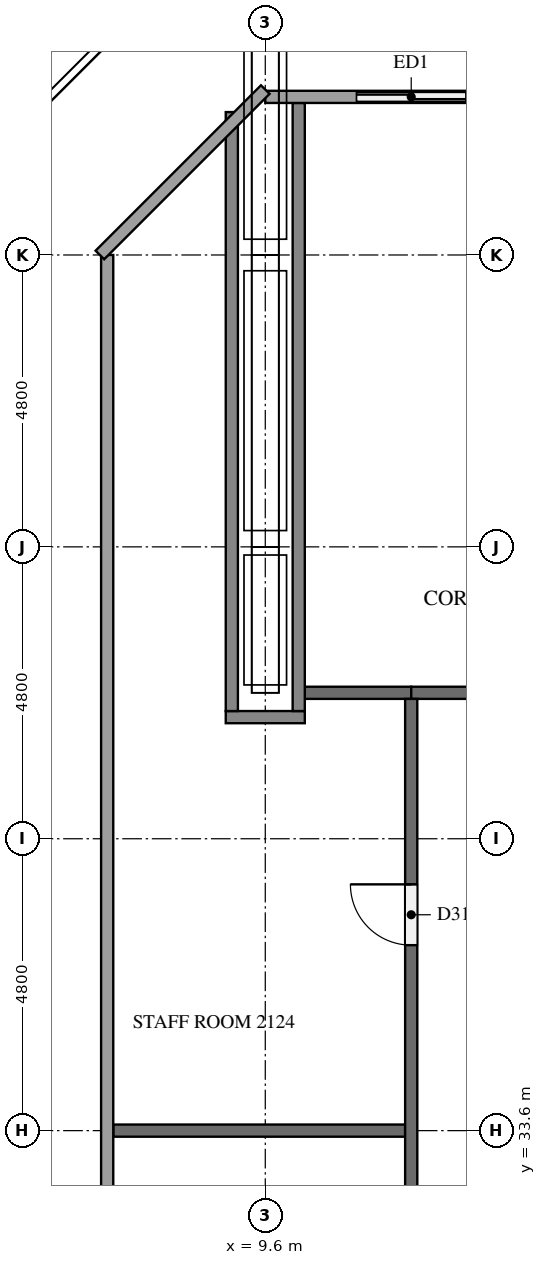
"""IFC4 building model, lengths in metres.
Left out: names, types, materials, properties, quantities, classifications, styles, units other than length and angle.
Written with IfcOpenShell. Run it as: python <this file> out.ifc"""

import sys

from ifc_helpers import new_model, si_unit, direction, frame, frame_2d, origin, place, context, subcontext, project, spatial, rectangle, extrude, element, fill, save


model = new_model("IFC4")
c1 = context("Model", 3, precision=1e-05, world=origin(), true_north=direction((0.0, 1.0)))
c2 = subcontext(c1, "Body", "Model", "MODEL_VIEW")
j1 = project(units=[si_unit("LENGTHUNIT", "METRE"), si_unit("PLANEANGLEUNIT", "RADIAN")], contexts=[c1])
p1 = place(None, origin())
s1 = spatial("IfcSite", under=j1, at=p1, CompositionType="ELEMENT")
p2 = place(p1, origin())
s2 = spatial("IfcBuilding", under=s1, at=p2, CompositionType="ELEMENT")
p3 = place(p2, frame((0.0, 0.0, 83.8)))
s3 = spatial("IfcBuildingStorey", under=s2, at=p3, CompositionType="ELEMENT", Elevation=83.8)
p4 = place(p3, frame((13.2, 50.6, 0.0), z_axis=(0.0, 0.0, 1.0), x_axis=(-1.0, 0.0, 0.0)))
e1 = element("IfcWall", 1, at=p4, inside=s3, PredefinedType="SOLIDWALL", context=c2, shape_type="SweptSolid", body=[
    extrude(rectangle(XDim=2.4, YDim=0.15, at=frame_2d((1.2, 0.0))), origin(), (0.0, 0.0, 1.0), 5.1),
])
p5 = place(p4, frame((0.3, 0.0, 0.0)))
e2 = element("IfcOpeningElement", 2, at=p5, cuts=e1, PredefinedType="OPENING", context=c2, shape_type="SweptSolid", body=[
    extrude(rectangle(XDim=1.8, YDim=2.4, at=frame_2d((0.9, 1.2))), frame((0.0, 0.085, 0.0), z_axis=(0.0, -1.0, 0.0), x_axis=(1.0, 0.0, 0.0)), (0.0, 0.0, 1.0), 0.17),
])
p6 = place(p3, frame((7.1, 33.6, 0.0), z_axis=(0.0, 0.0, 1.0), x_axis=(1.0, 0.0, 0.0)))
e3 = element("IfcWall", 3, at=p6, inside=s3, PredefinedType="PARTITIONING", context=c2, shape_type="SweptSolid", body=[
    extrude(rectangle(XDim=4.8, YDim=0.2, at=frame_2d((2.4, 0.0))), origin(), (0.0, 0.0, 1.0), 5.1),
])
p7 = place(p3, frame((8.95, 40.4, 0.0), z_axis=(0.0, 0.0, 1.0), x_axis=(1.0, 0.0, 0.0)))
e4 = element("IfcWall", 4, at=p7, inside=s3, PredefinedType="PARTITIONING", context=c2, shape_type="SweptSolid", body=[
    extrude(rectangle(XDim=1.3, YDim=0.2, at=frame_2d((0.65, 0.0))), origin(), (0.0, 0.0, 1.0), 5.1),
])
p8 = place(p3, frame((10.25, 40.8, 0.0), z_axis=(0.0, 0.0, 1.0), x_axis=(1.0, 0.0, 0.0)))
e5 = element("IfcWall", 5, at=p8, inside=s3, PredefinedType="PARTITIONING", context=c2, shape_type="SweptSolid", body=[
    extrude(rectangle(XDim=1.75, YDim=0.2, at=frame_2d((0.875, 0.0))), origin(), (0.0, 0.0, 1.0), 5.1),
])
p9 = place(p3, frame((12.0, 40.8, 0.0), z_axis=(0.0, 0.0, 1.0), x_axis=(1.0, 0.0, 0.0)))
e6 = element("IfcWall", 6, at=p9, inside=s3, PredefinedType="PARTITIONING", context=c2, shape_type="SweptSolid", body=[
    extrude(rectangle(XDim=6.75, YDim=0.2, at=frame_2d((3.375, 0.0))), origin(), (0.0, 0.0, 1.0), 5.1),
])
p10 = place(p9, frame((2.85, 0.0, 0.0)))
e7 = element("IfcOpeningElement", 7, at=p10, cuts=e6, PredefinedType="OPENING", context=c2, shape_type="SweptSolid", body=[
    extrude(rectangle(XDim=1.0, YDim=2.1, at=frame_2d((0.5, 1.05))), frame((0.0, 0.11, 0.0), z_axis=(0.0, -1.0, 0.0), x_axis=(1.0, 0.0, 0.0)), (0.0, 0.0, 1.0), 0.22),
])
p11 = place(p3, frame((9.05, 40.5, 0.0), z_axis=(0.0, 0.0, 1.0), x_axis=(0.0, 1.0, 0.0)))
e8 = element("IfcWall", 8, at=p11, inside=s3, PredefinedType="PARTITIONING", context=c2, shape_type="SweptSolid", body=[
    extrude(rectangle(XDim=9.85, YDim=0.2, at=frame_2d((4.925, 0.0))), origin(), (0.0, 0.0, 1.0), 5.1),
])
p12 = place(p3, frame((10.15, 40.5, 0.0), z_axis=(0.0, 0.0, 1.0), x_axis=(0.0, 1.0, 0.0)))
e9 = element("IfcWall", 9, at=p12, inside=s3, PredefinedType="PARTITIONING", context=c2, shape_type="SweptSolid", body=[
    extrude(rectangle(XDim=10.0, YDim=0.2, at=frame_2d((5.0, 0.0))), origin(), (0.0, 0.0, 1.0), 5.1),
])
p13 = place(p3, frame((12.0, 12.1, 0.0), z_axis=(0.0, 0.0, 1.0), x_axis=(0.0, 1.0, 0.0)))
e10 = element("IfcWall", 10, at=p13, inside=s3, PredefinedType="PARTITIONING", context=c2, shape_type="SweptSolid", body=[
    extrude(rectangle(XDim=28.6, YDim=0.2, at=frame_2d((14.3, 0.0))), origin(), (0.0, 0.0, 1.0), 5.1),
])
p14 = place(p13, frame((3.05, 0.0, 0.0)))
e11 = element("IfcOpeningElement", 11, at=p14, cuts=e10, PredefinedType="OPENING", context=c2, shape_type="SweptSolid", body=[
    extrude(rectangle(XDim=1.0, YDim=2.1, at=frame_2d((0.5, 1.05))), frame((0.0, 0.11, 0.0), z_axis=(0.0, -1.0, 0.0), x_axis=(1.0, 0.0, 0.0)), (0.0, 0.0, 1.0), 0.22),
])
p15 = place(p13, frame((9.05, 0.0, 0.0)))
e12 = element("IfcOpeningElement", 12, at=p15, cuts=e10, PredefinedType="OPENING", context=c2, shape_type="SweptSolid", body=[
    extrude(rectangle(XDim=1.0, YDim=2.1, at=frame_2d((0.5, 1.05))), frame((0.0, 0.11, 0.0), z_axis=(0.0, -1.0, 0.0), x_axis=(1.0, 0.0, 0.0)), (0.0, 0.0, 1.0), 0.22),
])
p16 = place(p13, frame((13.85, 0.0, 0.0)))
e13 = element("IfcOpeningElement", 13, at=p16, cuts=e10, PredefinedType="OPENING", context=c2, shape_type="SweptSolid", body=[
    extrude(rectangle(XDim=1.0, YDim=2.1, at=frame_2d((0.5, 1.05))), frame((0.0, 0.11, 0.0), z_axis=(0.0, -1.0, 0.0), x_axis=(1.0, 0.0, 0.0)), (0.0, 0.0, 1.0), 0.22),
])
p17 = place(p13, frame((18.65, 0.0, 0.0)))
e14 = element("IfcOpeningElement", 14, at=p17, cuts=e10, PredefinedType="OPENING", context=c2, shape_type="SweptSolid", body=[
    extrude(rectangle(XDim=1.0, YDim=2.1, at=frame_2d((0.5, 1.05))), frame((0.0, 0.11, 0.0), z_axis=(0.0, -1.0, 0.0), x_axis=(1.0, 0.0, 0.0)), (0.0, 0.0, 1.0), 0.22),
])
p18 = place(p13, frame((24.55, 0.0, 0.0)))
e15 = element("IfcOpeningElement", 15, at=p18, cuts=e10, PredefinedType="OPENING", context=c2, shape_type="SweptSolid", body=[
    extrude(rectangle(XDim=1.0, YDim=2.1, at=frame_2d((0.5, 1.05))), frame((0.0, 0.11, 0.0), z_axis=(0.0, -1.0, 0.0), x_axis=(1.0, 0.0, 0.0)), (0.0, 0.0, 1.0), 0.22),
])
p19 = place(p5, origin())
e16 = element("IfcDoor", 16, at=p19, inside=s3, OperationType="SLIDING_TO_LEFT", PredefinedType="DOOR", context=c2, shape_type="SweptSolid", body=[
    extrude(rectangle(XDim=1.8, YDim=2.4, at=frame_2d((0.9, 1.2))), frame((0.0, 0.025, 0.0), z_axis=(0.0, -1.0, 0.0), x_axis=(1.0, 0.0, 0.0)), (0.0, 0.0, 1.0), 0.05),
])
fill(e2, e16)
p20 = place(p18, origin())
e17 = element("IfcDoor", 17, at=p20, inside=s3, OperationType="SINGLE_SWING_RIGHT", PredefinedType="DOOR", context=c2, shape_type="SweptSolid", body=[
    extrude(rectangle(XDim=1.0, YDim=2.1, at=frame_2d((0.5, 1.05))), frame((0.0, 0.025, 0.0), z_axis=(0.0, -1.0, 0.0), x_axis=(1.0, 0.0, 0.0)), (0.0, 0.0, 1.0), 0.05),
])
fill(e15, e17)
save(model, sys.argv[1])
